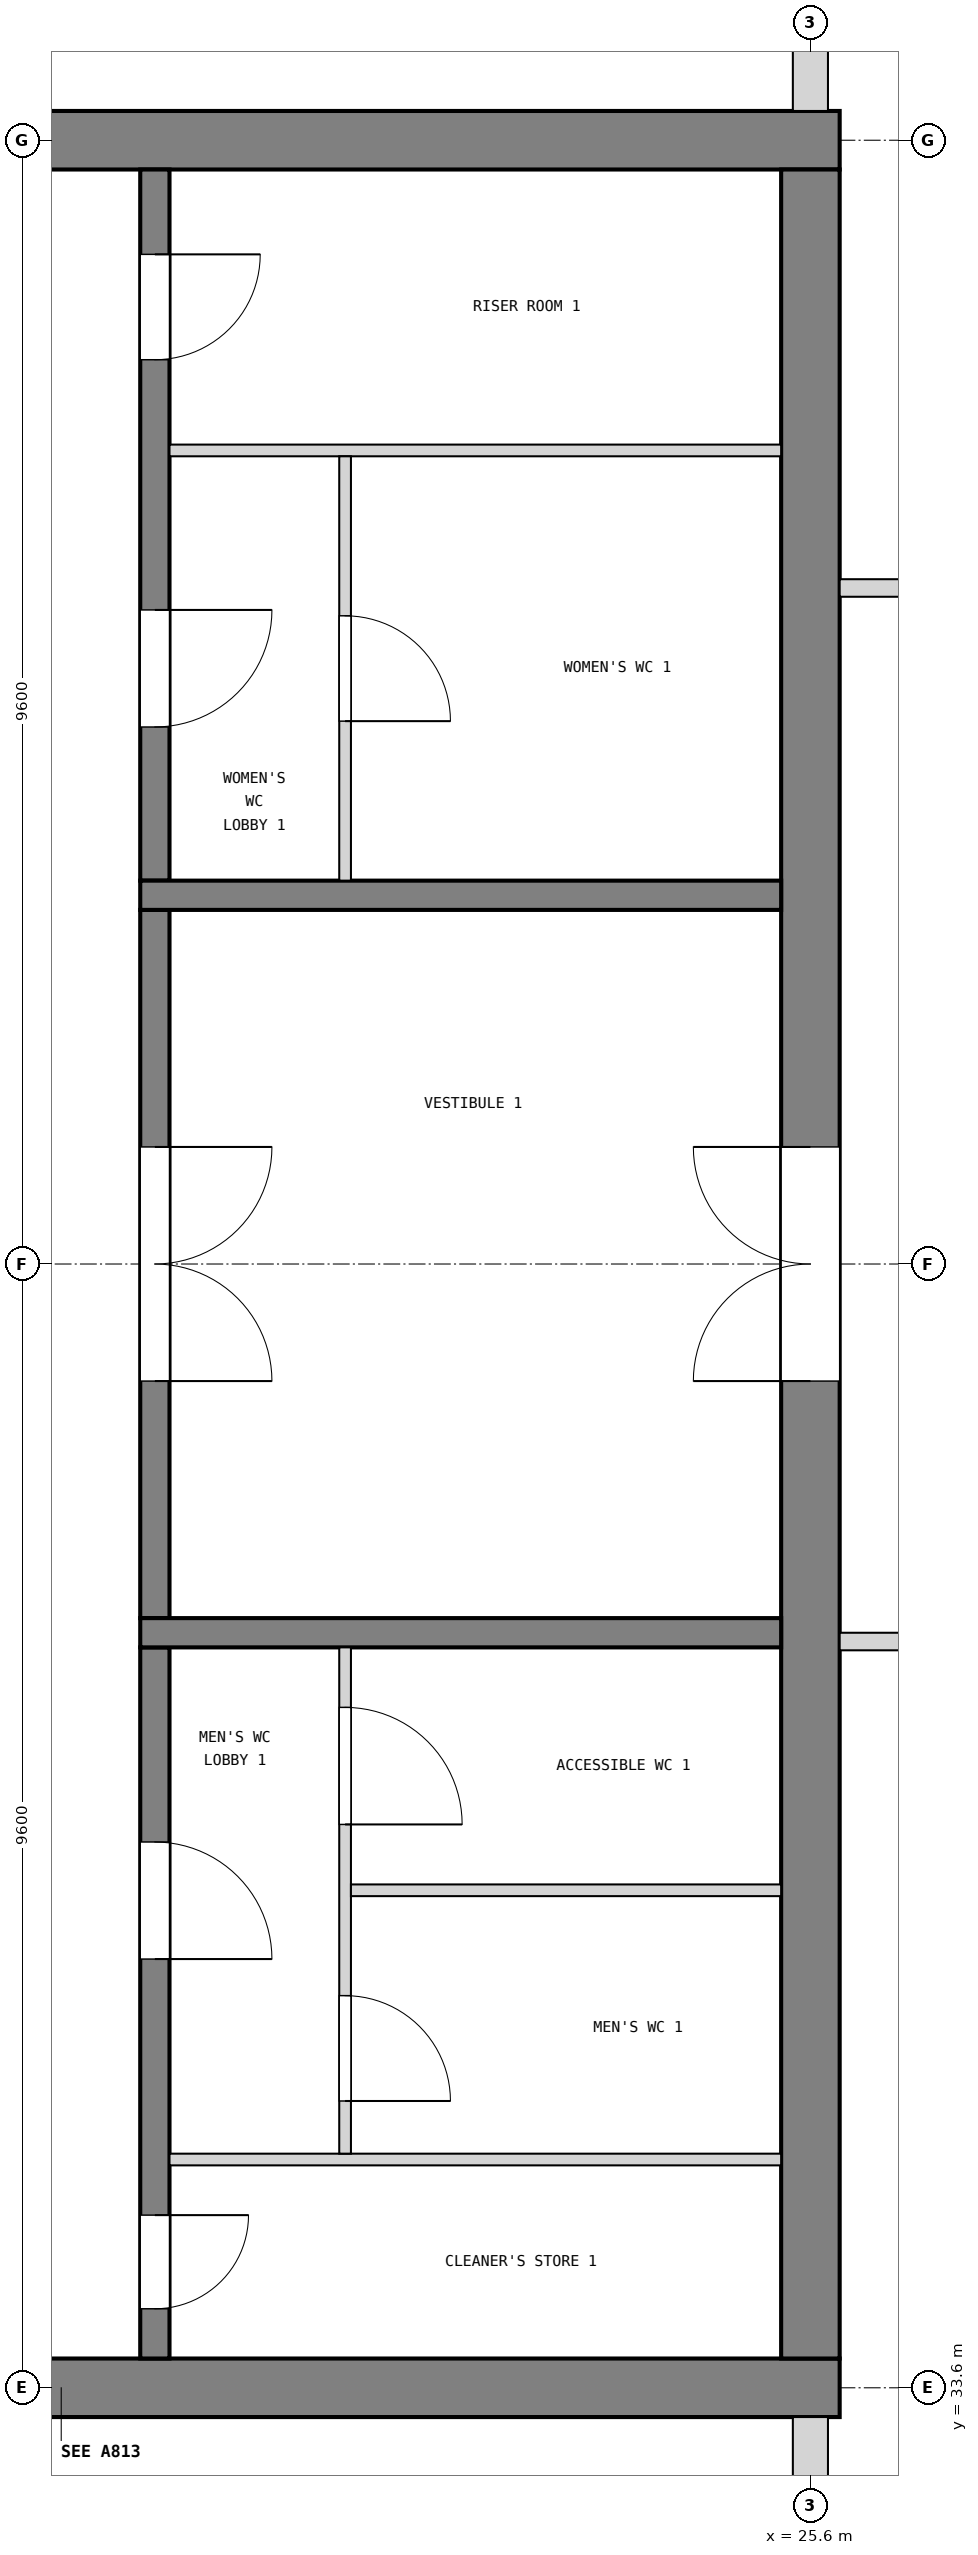
"""IFC4 building model, lengths in metres.
Left out: names, types, materials, properties, quantities, classifications, styles, units other than length and angle.
Written with IfcOpenShell. Run it as: python <this file> out.ifc"""

import sys

from ifc_helpers import new_model, si_unit, direction, frame, frame_2d, origin, place, context, subcontext, project, spatial, rectangle, extrude, element, fill, save


model = new_model("IFC4")
c1 = context("Model", 3, precision=1e-05, world=origin(), true_north=direction((0.0, 1.0)))
c2 = subcontext(c1, "Body", "Model", "MODEL_VIEW")
j1 = project(units=[si_unit("LENGTHUNIT", "METRE"), si_unit("PLANEANGLEUNIT", "RADIAN")], contexts=[c1])
p1 = place(None, origin())
s1 = spatial("IfcSite", under=j1, at=p1, CompositionType="ELEMENT")
p2 = place(p1, origin())
s2 = spatial("IfcBuilding", under=s1, at=p2, CompositionType="ELEMENT")
p3 = place(p2, frame((0.0, 0.0, 44.4)))
s3 = spatial("IfcBuildingStorey", under=s2, at=p3, CompositionType="ELEMENT", Elevation=44.4)
p4 = place(p3, frame((12.55, 52.8, 0.0), z_axis=(0.0, 0.0, 1.0), x_axis=(1.0, 0.0, 0.0)))
e1 = element("IfcWall", 1, at=p4, inside=s3, PredefinedType="SHEAR", context=c2, shape_type="SweptSolid", body=[
    extrude(rectangle(XDim=13.3, YDim=0.5, at=frame_2d((6.65, 0.0))), origin(), (0.0, 0.0, 1.0), 3.9),
])
p5 = place(p4, frame((1.85, 0.0, 1.0)))
e2 = element("IfcOpeningElement", 2, at=p5, cuts=e1, PredefinedType="OPENING", context=c2, shape_type="SweptSolid", body=[
    extrude(rectangle(XDim=0.4, YDim=2.0, at=frame_2d((0.2, 1.0))), frame((0.0, 0.26, 0.0), z_axis=(0.0, -1.0, 0.0), x_axis=(1.0, 0.0, 0.0)), (0.0, 0.0, 1.0), 0.52),
])
p6 = place(p3, frame((12.55, 33.6, 0.0), z_axis=(0.0, 0.0, 1.0), x_axis=(1.0, 0.0, 0.0)))
e3 = element("IfcWall", 3, at=p6, inside=s3, PredefinedType="SHEAR", context=c2, shape_type="SweptSolid", body=[
    extrude(rectangle(XDim=13.3, YDim=0.5, at=frame_2d((6.65, 0.0))), origin(), (0.0, 0.0, 1.0), 3.9),
])
p7 = place(p6, frame((1.85, 0.0, 1.0)))
e4 = element("IfcOpeningElement", 4, at=p7, cuts=e3, PredefinedType="OPENING", context=c2, shape_type="SweptSolid", body=[
    extrude(rectangle(XDim=0.4, YDim=2.0, at=frame_2d((0.2, 1.0))), frame((0.0, 0.26, 0.0), z_axis=(0.0, -1.0, 0.0), x_axis=(1.0, 0.0, 0.0)), (0.0, 0.0, 1.0), 0.52),
])
p8 = place(p3, frame((25.6, 33.85, 0.0), z_axis=(0.0, 0.0, 1.0), x_axis=(0.0, 1.0, 0.0)))
e5 = element("IfcWall", 5, at=p8, inside=s3, PredefinedType="SHEAR", context=c2, shape_type="SweptSolid", body=[
    extrude(rectangle(XDim=18.7, YDim=0.5, at=frame_2d((9.35, 0.0))), origin(), (0.0, 0.0, 1.0), 3.9),
])
p9 = place(p8, frame((8.35, 0.0, 0.0)))
e6 = element("IfcOpeningElement", 6, at=p9, cuts=e5, PredefinedType="OPENING", context=c2, shape_type="SweptSolid", body=[
    extrude(rectangle(XDim=2.0, YDim=2.1, at=frame_2d((1.0, 1.05))), frame((0.0, 0.26, 0.0), z_axis=(0.0, -1.0, 0.0), x_axis=(1.0, 0.0, 0.0)), (0.0, 0.0, 1.0), 0.52),
])
p10 = place(p3, frame((25.6, 31.0, 0.0), z_axis=(0.0, 0.0, 1.0), x_axis=(0.0, 1.0, 0.0)))
e7 = element("IfcWall", 7, at=p10, inside=s3, PredefinedType="SOLIDWALL", context=c2, shape_type="SweptSolid", body=[
    extrude(rectangle(XDim=2.35, YDim=0.3, at=frame_2d((1.175, 0.0))), origin(), (0.0, 0.0, 1.0), 2.88),
])
p11 = place(p3, frame((25.6, 53.05, 0.0), z_axis=(0.0, 0.0, 1.0), x_axis=(0.0, 1.0, 0.0)))
e8 = element("IfcWall", 8, at=p11, inside=s3, PredefinedType="SOLIDWALL", context=c2, shape_type="SweptSolid", body=[
    extrude(rectangle(XDim=2.35, YDim=0.3, at=frame_2d((1.175, 0.0))), origin(), (0.0, 0.0, 1.0), 2.88),
])
p12 = place(p3, frame((20.0, 33.85, 0.0), z_axis=(0.0, 0.0, 1.0), x_axis=(0.0, 1.0, 0.0)))
e9 = element("IfcWall", 9, at=p12, inside=s3, PredefinedType="SOLIDWALL", context=c2, shape_type="SweptSolid", body=[
    extrude(rectangle(XDim=6.075, YDim=0.25, at=frame_2d((3.038, 0.0))), origin(), (0.0, 0.0, 1.0), 3.6),
])
p13 = place(p12, frame((0.425, 0.0, 0.0)))
e10 = element("IfcOpeningElement", 10, at=p13, cuts=e9, PredefinedType="OPENING", context=c2, shape_type="SweptSolid", body=[
    extrude(rectangle(XDim=0.8, YDim=2.1, at=frame_2d((0.4, 1.05))), frame((0.0, 0.135, 0.0), z_axis=(0.0, -1.0, 0.0), x_axis=(1.0, 0.0, 0.0)), (0.0, 0.0, 1.0), 0.27),
])
p14 = place(p12, frame((3.413, 0.0, 0.0)))
e11 = element("IfcOpeningElement", 11, at=p14, cuts=e9, PredefinedType="OPENING", context=c2, shape_type="SweptSolid", body=[
    extrude(rectangle(XDim=1.0, YDim=2.1, at=frame_2d((0.5, 1.05))), frame((0.0, 0.135, 0.0), z_axis=(0.0, -1.0, 0.0), x_axis=(1.0, 0.0, 0.0)), (0.0, 0.0, 1.0), 0.27),
])
p15 = place(p3, frame((20.0, 40.175, 0.0), z_axis=(0.0, 0.0, 1.0), x_axis=(0.0, 1.0, 0.0)))
e12 = element("IfcWall", 12, at=p15, inside=s3, PredefinedType="SOLIDWALL", context=c2, shape_type="SweptSolid", body=[
    extrude(rectangle(XDim=6.05, YDim=0.25, at=frame_2d((3.025, 0.0))), origin(), (0.0, 0.0, 1.0), 3.6),
])
p16 = place(p15, frame((2.025, 0.0, 0.0)))
e13 = element("IfcOpeningElement", 13, at=p16, cuts=e12, PredefinedType="OPENING", context=c2, shape_type="SweptSolid", body=[
    extrude(rectangle(XDim=2.0, YDim=2.1, at=frame_2d((1.0, 1.05))), frame((0.0, 0.135, 0.0), z_axis=(0.0, -1.0, 0.0), x_axis=(1.0, 0.0, 0.0)), (0.0, 0.0, 1.0), 0.27),
])
p17 = place(p3, frame((20.0, 46.475, 0.0), z_axis=(0.0, 0.0, 1.0), x_axis=(0.0, 1.0, 0.0)))
e14 = element("IfcWall", 14, at=p17, inside=s3, PredefinedType="SOLIDWALL", context=c2, shape_type="SweptSolid", body=[
    extrude(rectangle(XDim=6.075, YDim=0.25, at=frame_2d((3.038, 0.0))), origin(), (0.0, 0.0, 1.0), 3.6),
])
p18 = place(p17, frame((1.312, 0.0, 0.0)))
e15 = element("IfcOpeningElement", 15, at=p18, cuts=e14, PredefinedType="OPENING", context=c2, shape_type="SweptSolid", body=[
    extrude(rectangle(XDim=1.0, YDim=2.1, at=frame_2d((0.5, 1.05))), frame((0.0, 0.135, 0.0), z_axis=(0.0, -1.0, 0.0), x_axis=(1.0, 0.0, 0.0)), (0.0, 0.0, 1.0), 0.27),
])
p19 = place(p17, frame((4.45, 0.0, 0.0)))
e16 = element("IfcOpeningElement", 16, at=p19, cuts=e14, PredefinedType="OPENING", context=c2, shape_type="SweptSolid", body=[
    extrude(rectangle(XDim=0.9, YDim=2.1, at=frame_2d((0.45, 1.05))), frame((0.0, 0.135, 0.0), z_axis=(0.0, -1.0, 0.0), x_axis=(1.0, 0.0, 0.0)), (0.0, 0.0, 1.0), 0.27),
])
for number, where, z_axis, x_axis in (
    (17, (19.875, 40.05, 0.0), (0.0, 0.0, 1.0), (1.0, 0.0, 0.0)),
    (18, (19.875, 46.35, 0.0), (0.0, 0.0, 1.0), (1.0, 0.0, 0.0)),
):
    element("IfcWall", number, at=place(p3, frame(where, z_axis=z_axis, x_axis=x_axis)), inside=s3, PredefinedType="SOLIDWALL", context=c2, shape_type="SweptSolid", body=[
        extrude(rectangle(XDim=5.475, YDim=0.25, at=frame_2d((2.738, 0.0))), origin(), (0.0, 0.0, 1.0), 3.6),
    ])
p20 = place(p3, frame((20.125, 35.55, 0.0), z_axis=(0.0, 0.0, 1.0), x_axis=(1.0, 0.0, 0.0)))
e19 = element("IfcWall", 19, at=p20, inside=s3, PredefinedType="PARTITIONING", context=c2, shape_type="SweptSolid", body=[
    extrude(rectangle(XDim=5.225, YDim=0.1, at=frame_2d((2.613, 0.0))), origin(), (0.0, 0.0, 1.0), 3.6),
])
p21 = place(p3, frame((21.625, 35.6, 0.0), z_axis=(0.0, 0.0, 1.0), x_axis=(0.0, 1.0, 0.0)))
e20 = element("IfcWall", 20, at=p21, inside=s3, PredefinedType="PARTITIONING", context=c2, shape_type="SweptSolid", body=[
    extrude(rectangle(XDim=4.325, YDim=0.1, at=frame_2d((2.163, 0.0))), origin(), (0.0, 0.0, 1.0), 3.6),
])
p22 = place(p21, frame((0.45, 0.0, 0.0)))
e21 = element("IfcOpeningElement", 21, at=p22, cuts=e20, PredefinedType="OPENING", context=c2, shape_type="SweptSolid", body=[
    extrude(rectangle(XDim=0.9, YDim=2.1, at=frame_2d((0.45, 1.05))), frame((0.0, 0.06, 0.0), z_axis=(0.0, -1.0, 0.0), x_axis=(1.0, 0.0, 0.0)), (0.0, 0.0, 1.0), 0.12),
])
p23 = place(p21, frame((2.812, 0.0, 0.0)))
e22 = element("IfcOpeningElement", 22, at=p23, cuts=e20, PredefinedType="OPENING", context=c2, shape_type="SweptSolid", body=[
    extrude(rectangle(XDim=1.0, YDim=2.1, at=frame_2d((0.5, 1.05))), frame((0.0, 0.06, 0.0), z_axis=(0.0, -1.0, 0.0), x_axis=(1.0, 0.0, 0.0)), (0.0, 0.0, 1.0), 0.12),
])
p24 = place(p3, frame((21.675, 37.85, 0.0), z_axis=(0.0, 0.0, 1.0), x_axis=(1.0, 0.0, 0.0)))
e23 = element("IfcWall", 23, at=p24, inside=s3, PredefinedType="PARTITIONING", context=c2, shape_type="SweptSolid", body=[
    extrude(rectangle(XDim=3.675, YDim=0.1, at=frame_2d((1.837, 0.0))), origin(), (0.0, 0.0, 1.0), 3.6),
])
p25 = place(p3, frame((20.125, 50.15, 0.0), z_axis=(0.0, 0.0, 1.0), x_axis=(1.0, 0.0, 0.0)))
e24 = element("IfcWall", 24, at=p25, inside=s3, PredefinedType="PARTITIONING", context=c2, shape_type="SweptSolid", body=[
    extrude(rectangle(XDim=5.225, YDim=0.1, at=frame_2d((2.613, 0.0))), origin(), (0.0, 0.0, 1.0), 3.6),
])
p26 = place(p3, frame((21.625, 46.475, 0.0), z_axis=(0.0, 0.0, 1.0), x_axis=(0.0, 1.0, 0.0)))
e25 = element("IfcWall", 25, at=p26, inside=s3, PredefinedType="PARTITIONING", context=c2, shape_type="SweptSolid", body=[
    extrude(rectangle(XDim=3.625, YDim=0.1, at=frame_2d((1.812, 0.0))), origin(), (0.0, 0.0, 1.0), 3.6),
])
p27 = place(p26, frame((1.363, 0.0, 0.0)))
e26 = element("IfcOpeningElement", 26, at=p27, cuts=e25, PredefinedType="OPENING", context=c2, shape_type="SweptSolid", body=[
    extrude(rectangle(XDim=0.9, YDim=2.1, at=frame_2d((0.45, 1.05))), frame((0.0, 0.06, 0.0), z_axis=(0.0, -1.0, 0.0), x_axis=(1.0, 0.0, 0.0)), (0.0, 0.0, 1.0), 0.12),
])
p28 = place(p3, frame((25.85, 48.975, 0.0), z_axis=(0.0, 0.0, 1.0), x_axis=(1.0, 0.0, 0.0)))
e27 = element("IfcWall", 27, at=p28, inside=s3, PredefinedType="PARTITIONING", context=c2, shape_type="SweptSolid", body=[
    extrude(rectangle(XDim=5.97, YDim=0.15, at=frame_2d((2.985, 0.0))), origin(), (0.0, 0.0, 1.0), 3.68),
])
p29 = place(p28, frame((2.45, 0.0, 0.0)))
e28 = element("IfcOpeningElement", 28, at=p29, cuts=e27, PredefinedType="OPENING", context=c2, shape_type="SweptSolid", body=[
    extrude(rectangle(XDim=1.0, YDim=2.1, at=frame_2d((0.5, 1.05))), frame((0.0, 0.085, 0.0), z_axis=(0.0, -1.0, 0.0), x_axis=(1.0, 0.0, 0.0)), (0.0, 0.0, 1.0), 0.17),
])
p30 = place(p3, frame((25.85, 39.975, 0.0), z_axis=(0.0, 0.0, 1.0), x_axis=(1.0, 0.0, 0.0)))
e29 = element("IfcWall", 29, at=p30, inside=s3, PredefinedType="PARTITIONING", context=c2, shape_type="SweptSolid", body=[
    extrude(rectangle(XDim=5.97, YDim=0.15, at=frame_2d((2.985, 0.0))), origin(), (0.0, 0.0, 1.0), 3.68),
])
p31 = place(p30, frame((2.45, 0.0, 0.0)))
e30 = element("IfcOpeningElement", 30, at=p31, cuts=e29, PredefinedType="OPENING", context=c2, shape_type="SweptSolid", body=[
    extrude(rectangle(XDim=1.0, YDim=2.1, at=frame_2d((0.5, 1.05))), frame((0.0, 0.085, 0.0), z_axis=(0.0, -1.0, 0.0), x_axis=(1.0, 0.0, 0.0)), (0.0, 0.0, 1.0), 0.17),
])
p32 = place(p16, frame((2.0, 0.0, 0.0), z_axis=(0.0, 0.0, 1.0), x_axis=(-1.0, 0.0, 0.0)))
e31 = element("IfcDoor", 31, at=p32, inside=s3, OperationType="DOUBLE_DOOR_SINGLE_SWING", PredefinedType="DOOR", context=c2, shape_type="SweptSolid", body=[
    extrude(rectangle(XDim=2.0, YDim=2.1, at=frame_2d((1.0, 1.05))), frame((0.0, 0.025, 0.0), z_axis=(0.0, -1.0, 0.0), x_axis=(1.0, 0.0, 0.0)), (0.0, 0.0, 1.0), 0.05),
])
fill(e13, e31)
p33 = place(p9, origin())
e32 = element("IfcDoor", 32, at=p33, inside=s3, OperationType="DOUBLE_DOOR_SINGLE_SWING", PredefinedType="DOOR", context=c2, shape_type="SweptSolid", body=[
    extrude(rectangle(XDim=2.0, YDim=2.1, at=frame_2d((1.0, 1.05))), frame((0.0, 0.025, 0.0), z_axis=(0.0, -1.0, 0.0), x_axis=(1.0, 0.0, 0.0)), (0.0, 0.0, 1.0), 0.05),
])
fill(e6, e32)
p34 = place(p13, frame((0.8, 0.0, 0.0), z_axis=(0.0, 0.0, 1.0), x_axis=(-1.0, 0.0, 0.0)))
e33 = element("IfcDoor", 33, at=p34, inside=s3, OperationType="SINGLE_SWING_LEFT", PredefinedType="DOOR", context=c2, shape_type="SweptSolid", body=[
    extrude(rectangle(XDim=0.8, YDim=2.1, at=frame_2d((0.4, 1.05))), frame((0.0, 0.025, 0.0), z_axis=(0.0, -1.0, 0.0), x_axis=(1.0, 0.0, 0.0)), (0.0, 0.0, 1.0), 0.05),
])
fill(e10, e33)
p35 = place(p14, frame((1.0, 0.0, 0.0), z_axis=(0.0, 0.0, 1.0), x_axis=(-1.0, 0.0, 0.0)))
e34 = element("IfcDoor", 34, at=p35, inside=s3, OperationType="SINGLE_SWING_RIGHT", PredefinedType="DOOR", context=c2, shape_type="SweptSolid", body=[
    extrude(rectangle(XDim=1.0, YDim=2.1, at=frame_2d((0.5, 1.05))), frame((0.0, 0.025, 0.0), z_axis=(0.0, -1.0, 0.0), x_axis=(1.0, 0.0, 0.0)), (0.0, 0.0, 1.0), 0.05),
])
fill(e11, e34)
p36 = place(p22, frame((0.9, 0.0, 0.0), z_axis=(0.0, 0.0, 1.0), x_axis=(-1.0, 0.0, 0.0)))
e35 = element("IfcDoor", 35, at=p36, inside=s3, OperationType="SINGLE_SWING_RIGHT", PredefinedType="DOOR", context=c2, shape_type="SweptSolid", body=[
    extrude(rectangle(XDim=0.9, YDim=2.1, at=frame_2d((0.45, 1.05))), frame((0.0, 0.025, 0.0), z_axis=(0.0, -1.0, 0.0), x_axis=(1.0, 0.0, 0.0)), (0.0, 0.0, 1.0), 0.05),
])
fill(e21, e35)
p37 = place(p23, frame((1.0, 0.0, 0.0), z_axis=(0.0, 0.0, 1.0), x_axis=(-1.0, 0.0, 0.0)))
e36 = element("IfcDoor", 36, at=p37, inside=s3, OperationType="SINGLE_SWING_RIGHT", PredefinedType="DOOR", context=c2, shape_type="SweptSolid", body=[
    extrude(rectangle(XDim=1.0, YDim=2.1, at=frame_2d((0.5, 1.05))), frame((0.0, 0.025, 0.0), z_axis=(0.0, -1.0, 0.0), x_axis=(1.0, 0.0, 0.0)), (0.0, 0.0, 1.0), 0.05),
])
fill(e22, e36)
p38 = place(p18, frame((1.0, 0.0, 0.0), z_axis=(0.0, 0.0, 1.0), x_axis=(-1.0, 0.0, 0.0)))
e37 = element("IfcDoor", 37, at=p38, inside=s3, OperationType="SINGLE_SWING_LEFT", PredefinedType="DOOR", context=c2, shape_type="SweptSolid", body=[
    extrude(rectangle(XDim=1.0, YDim=2.1, at=frame_2d((0.5, 1.05))), frame((0.0, 0.025, 0.0), z_axis=(0.0, -1.0, 0.0), x_axis=(1.0, 0.0, 0.0)), (0.0, 0.0, 1.0), 0.05),
])
fill(e15, e37)
p39 = place(p27, frame((0.9, 0.0, 0.0), z_axis=(0.0, 0.0, 1.0), x_axis=(-1.0, 0.0, 0.0)))
e38 = element("IfcDoor", 38, at=p39, inside=s3, OperationType="SINGLE_SWING_RIGHT", PredefinedType="DOOR", context=c2, shape_type="SweptSolid", body=[
    extrude(rectangle(XDim=0.9, YDim=2.1, at=frame_2d((0.45, 1.05))), frame((0.0, 0.025, 0.0), z_axis=(0.0, -1.0, 0.0), x_axis=(1.0, 0.0, 0.0)), (0.0, 0.0, 1.0), 0.05),
])
fill(e26, e38)
p40 = place(p19, frame((0.9, 0.0, 0.0), z_axis=(0.0, 0.0, 1.0), x_axis=(-1.0, 0.0, 0.0)))
e39 = element("IfcDoor", 39, at=p40, inside=s3, OperationType="SINGLE_SWING_LEFT", PredefinedType="DOOR", context=c2, shape_type="SweptSolid", body=[
    extrude(rectangle(XDim=0.9, YDim=2.1, at=frame_2d((0.45, 1.05))), frame((0.0, 0.025, 0.0), z_axis=(0.0, -1.0, 0.0), x_axis=(1.0, 0.0, 0.0)), (0.0, 0.0, 1.0), 0.05),
])
fill(e16, e39)
save(model, sys.argv[1])
